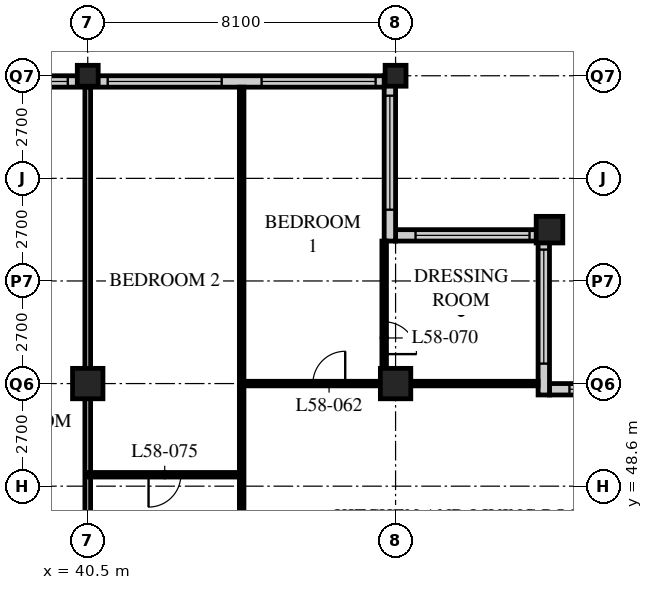
"""IFC4 building model, lengths in metres.
Left out: names, types, materials, properties, quantities, classifications, styles, units other than length and angle.
Written with IfcOpenShell. Run it as: python <this file> out.ifc"""

import sys

from ifc_helpers import new_model, si_unit, direction, frame, frame_2d, origin, origin_2d, place, context, subcontext, project, spatial, rectangle, hollow_rectangle, extrude, element, fill, save


model = new_model("IFC4")
c1 = context("Model", 3, precision=1e-05, world=origin(), true_north=direction((0.0, 1.0)))
c2 = subcontext(c1, "Body", "Model", "MODEL_VIEW")
j1 = project(units=[si_unit("LENGTHUNIT", "METRE"), si_unit("PLANEANGLEUNIT", "RADIAN")], contexts=[c1])
p1 = place(None, origin())
s1 = spatial("IfcSite", under=j1, at=p1, CompositionType="ELEMENT")
p2 = place(p1, origin())
s2 = spatial("IfcBuilding", under=s1, at=p2, CompositionType="ELEMENT")
p3 = place(p2, frame((0.0, 0.0, 224.4)))
s3 = spatial("IfcBuildingStorey", under=s2, at=p3, CompositionType="ELEMENT", Elevation=224.4)
p4 = place(p3, frame((40.5, 51.3, 0.0), z_axis=(0.0, 0.0, 1.0), x_axis=(1.0, 0.0, 0.0)))
e1 = element("IfcColumn", 1, at=p4, inside=s3, PredefinedType="COLUMN", context=c2, shape_type="SweptSolid", body=[
    extrude(hollow_rectangle(XDim=0.8, YDim=0.8, WallThickness=0.08, at=origin_2d()), origin(), (0.0, 0.0, 1.0), 3.6),
])
p5 = place(p3, frame((40.5, 59.4, 0.0), z_axis=(0.0, 0.0, 1.0), x_axis=(1.0, 0.0, 0.0)))
e2 = element("IfcColumn", 2, at=p5, inside=s3, PredefinedType="COLUMN", context=c2, shape_type="SweptSolid", body=[
    extrude(hollow_rectangle(XDim=0.55, YDim=0.55, WallThickness=0.045, at=origin_2d()), origin(), (0.0, 0.0, 1.0), 3.6),
])
p6 = place(p3, frame((48.6, 51.3, 0.0), z_axis=(0.0, 0.0, 1.0), x_axis=(1.0, 0.0, 0.0)))
e3 = element("IfcColumn", 3, at=p6, inside=s3, PredefinedType="COLUMN", context=c2, shape_type="SweptSolid", body=[
    extrude(hollow_rectangle(XDim=0.8, YDim=0.8, WallThickness=0.08, at=origin_2d()), origin(), (0.0, 0.0, 1.0), 3.6),
])
p7 = place(p3, frame((48.6, 59.4, 0.0), z_axis=(0.0, 0.0, 1.0), x_axis=(1.0, 0.0, 0.0)))
e4 = element("IfcColumn", 4, at=p7, inside=s3, PredefinedType="COLUMN", context=c2, shape_type="SweptSolid", body=[
    extrude(hollow_rectangle(XDim=0.55, YDim=0.55, WallThickness=0.045, at=origin_2d()), origin(), (0.0, 0.0, 1.0), 3.6),
])
p8 = place(p3, frame((52.65, 55.35, 0.0), z_axis=(0.0, 0.0, 1.0), x_axis=(1.0, 0.0, 0.0)))
e5 = element("IfcColumn", 5, at=p8, inside=s3, PredefinedType="COLUMN", context=c2, shape_type="SweptSolid", body=[
    extrude(hollow_rectangle(XDim=0.7, YDim=0.7, WallThickness=0.07, at=origin_2d()), origin(), (0.0, 0.0, 1.0), 3.6),
])
p9 = place(p3, frame((56.4, 51.15, 0.0), z_axis=(0.0, 0.0, 1.0), x_axis=(-1.0, 0.0, 0.0)))
e6 = element("IfcWall", 6, at=p9, inside=s3, PredefinedType="SOLIDWALL", context=c2, shape_type="SweptSolid", body=[
    extrude(rectangle(XDim=3.75, YDim=0.3, at=frame_2d((1.875, 0.0))), origin(), (0.0, 0.0, 1.0), 3.39),
])
p10 = place(p9, frame((0.225, 0.0, 0.6)))
e7 = element("IfcOpeningElement", 7, at=p10, cuts=e6, PredefinedType="OPENING", context=c2, shape_type="SweptSolid", body=[
    extrude(rectangle(XDim=3.0, YDim=2.0, at=frame_2d((1.5, 1.0))), frame((0.0, 0.16, 0.0), z_axis=(0.0, -1.0, 0.0), x_axis=(1.0, 0.0, 0.0)), (0.0, 0.0, 1.0), 0.32),
])
p11 = place(p3, frame((52.5, 51.0, 0.0), z_axis=(0.0, 0.0, 1.0), x_axis=(0.0, 1.0, 0.0)))
e8 = element("IfcWall", 8, at=p11, inside=s3, PredefinedType="SOLIDWALL", context=c2, shape_type="SweptSolid", body=[
    extrude(rectangle(XDim=4.35, YDim=0.3, at=frame_2d((2.175, 0.0))), origin(), (0.0, 0.0, 1.0), 3.39),
])
p12 = place(p11, frame((0.825, 0.0, 0.6)))
e9 = element("IfcOpeningElement", 9, at=p12, cuts=e8, PredefinedType="OPENING", context=c2, shape_type="SweptSolid", body=[
    extrude(rectangle(XDim=3.0, YDim=2.0, at=frame_2d((1.5, 1.0))), frame((0.0, 0.16, 0.0), z_axis=(0.0, -1.0, 0.0), x_axis=(1.0, 0.0, 0.0)), (0.0, 0.0, 1.0), 0.32),
])
p13 = place(p3, frame((52.35, 55.2, 0.0), z_axis=(0.0, 0.0, 1.0), x_axis=(-1.0, 0.0, 0.0)))
e10 = element("IfcWall", 10, at=p13, inside=s3, PredefinedType="SOLIDWALL", context=c2, shape_type="SweptSolid", body=[
    extrude(rectangle(XDim=3.75, YDim=0.3, at=frame_2d((1.875, 0.0))), origin(), (0.0, 0.0, 1.0), 3.39),
])
p14 = place(p13, frame((0.225, 0.0, 0.6)))
e11 = element("IfcOpeningElement", 11, at=p14, cuts=e10, PredefinedType="OPENING", context=c2, shape_type="SweptSolid", body=[
    extrude(rectangle(XDim=3.0, YDim=2.0, at=frame_2d((1.5, 1.0))), frame((0.0, 0.16, 0.0), z_axis=(0.0, -1.0, 0.0), x_axis=(1.0, 0.0, 0.0)), (0.0, 0.0, 1.0), 0.32),
])
p15 = place(p3, frame((48.45, 55.05, 0.0), z_axis=(0.0, 0.0, 1.0), x_axis=(0.0, 1.0, 0.0)))
e12 = element("IfcWall", 12, at=p15, inside=s3, PredefinedType="SOLIDWALL", context=c2, shape_type="SweptSolid", body=[
    extrude(rectangle(XDim=4.35, YDim=0.3, at=frame_2d((2.175, 0.0))), origin(), (0.0, 0.0, 1.0), 3.39),
])
p16 = place(p15, frame((0.825, 0.0, 0.6)))
e13 = element("IfcOpeningElement", 13, at=p16, cuts=e12, PredefinedType="OPENING", context=c2, shape_type="SweptSolid", body=[
    extrude(rectangle(XDim=3.0, YDim=2.0, at=frame_2d((1.5, 1.0))), frame((0.0, 0.16, 0.0), z_axis=(0.0, -1.0, 0.0), x_axis=(1.0, 0.0, 0.0)), (0.0, 0.0, 1.0), 0.32),
])
p17 = place(p3, frame((48.3, 59.25, 0.0), z_axis=(0.0, 0.0, 1.0), x_axis=(-1.0, 0.0, 0.0)))
e14 = element("IfcWall", 14, at=p17, inside=s3, PredefinedType="SOLIDWALL", context=c2, shape_type="SweptSolid", body=[
    extrude(rectangle(XDim=40.2, YDim=0.3, at=frame_2d((20.1, 0.0))), origin(), (0.0, 0.0, 1.0), 3.39),
])
p18 = place(p17, frame((0.225, 0.0, 0.6)))
e15 = element("IfcOpeningElement", 15, at=p18, cuts=e14, PredefinedType="OPENING", context=c2, shape_type="SweptSolid", body=[
    extrude(rectangle(XDim=3.0, YDim=2.0, at=frame_2d((1.5, 1.0))), frame((0.0, 0.16, 0.0), z_axis=(0.0, -1.0, 0.0), x_axis=(1.0, 0.0, 0.0)), (0.0, 0.0, 1.0), 0.32),
])
p19 = place(p17, frame((4.275, 0.0, 0.6)))
e16 = element("IfcOpeningElement", 16, at=p19, cuts=e14, PredefinedType="OPENING", context=c2, shape_type="SweptSolid", body=[
    extrude(rectangle(XDim=3.0, YDim=2.0, at=frame_2d((1.5, 1.0))), frame((0.0, 0.16, 0.0), z_axis=(0.0, -1.0, 0.0), x_axis=(1.0, 0.0, 0.0)), (0.0, 0.0, 1.0), 0.32),
])
p20 = place(p17, frame((8.325, 0.0, 0.6)))
e17 = element("IfcOpeningElement", 17, at=p20, cuts=e14, PredefinedType="OPENING", context=c2, shape_type="SweptSolid", body=[
    extrude(rectangle(XDim=3.0, YDim=2.0, at=frame_2d((1.5, 1.0))), frame((0.0, 0.16, 0.0), z_axis=(0.0, -1.0, 0.0), x_axis=(1.0, 0.0, 0.0)), (0.0, 0.0, 1.0), 0.32),
])
p21 = place(p17, frame((12.375, 0.0, 0.6)))
e18 = element("IfcOpeningElement", 18, at=p21, cuts=e14, PredefinedType="OPENING", context=c2, shape_type="SweptSolid", body=[
    extrude(rectangle(XDim=3.0, YDim=2.0, at=frame_2d((1.5, 1.0))), frame((0.0, 0.16, 0.0), z_axis=(0.0, -1.0, 0.0), x_axis=(1.0, 0.0, 0.0)), (0.0, 0.0, 1.0), 0.32),
])
p22 = place(p17, frame((16.425, 0.0, 0.6)))
e19 = element("IfcOpeningElement", 19, at=p22, cuts=e14, PredefinedType="OPENING", context=c2, shape_type="SweptSolid", body=[
    extrude(rectangle(XDim=3.0, YDim=2.0, at=frame_2d((1.5, 1.0))), frame((0.0, 0.16, 0.0), z_axis=(0.0, -1.0, 0.0), x_axis=(1.0, 0.0, 0.0)), (0.0, 0.0, 1.0), 0.32),
])
p23 = place(p17, frame((20.475, 0.0, 0.6)))
e20 = element("IfcOpeningElement", 20, at=p23, cuts=e14, PredefinedType="OPENING", context=c2, shape_type="SweptSolid", body=[
    extrude(rectangle(XDim=3.0, YDim=2.0, at=frame_2d((1.5, 1.0))), frame((0.0, 0.16, 0.0), z_axis=(0.0, -1.0, 0.0), x_axis=(1.0, 0.0, 0.0)), (0.0, 0.0, 1.0), 0.32),
])
p24 = place(p17, frame((24.525, 0.0, 0.6)))
e21 = element("IfcOpeningElement", 21, at=p24, cuts=e14, PredefinedType="OPENING", context=c2, shape_type="SweptSolid", body=[
    extrude(rectangle(XDim=3.0, YDim=2.0, at=frame_2d((1.5, 1.0))), frame((0.0, 0.16, 0.0), z_axis=(0.0, -1.0, 0.0), x_axis=(1.0, 0.0, 0.0)), (0.0, 0.0, 1.0), 0.32),
])
p25 = place(p17, frame((28.575, 0.0, 0.6)))
e22 = element("IfcOpeningElement", 22, at=p25, cuts=e14, PredefinedType="OPENING", context=c2, shape_type="SweptSolid", body=[
    extrude(rectangle(XDim=3.0, YDim=2.0, at=frame_2d((1.5, 1.0))), frame((0.0, 0.16, 0.0), z_axis=(0.0, -1.0, 0.0), x_axis=(1.0, 0.0, 0.0)), (0.0, 0.0, 1.0), 0.32),
])
p26 = place(p17, frame((32.625, 0.0, 0.6)))
e23 = element("IfcOpeningElement", 23, at=p26, cuts=e14, PredefinedType="OPENING", context=c2, shape_type="SweptSolid", body=[
    extrude(rectangle(XDim=3.0, YDim=2.0, at=frame_2d((1.5, 1.0))), frame((0.0, 0.16, 0.0), z_axis=(0.0, -1.0, 0.0), x_axis=(1.0, 0.0, 0.0)), (0.0, 0.0, 1.0), 0.32),
])
p27 = place(p17, frame((36.675, 0.0, 0.6)))
e24 = element("IfcOpeningElement", 24, at=p27, cuts=e14, PredefinedType="OPENING", context=c2, shape_type="SweptSolid", body=[
    extrude(rectangle(XDim=3.0, YDim=2.0, at=frame_2d((1.5, 1.0))), frame((0.0, 0.16, 0.0), z_axis=(0.0, -1.0, 0.0), x_axis=(1.0, 0.0, 0.0)), (0.0, 0.0, 1.0), 0.32),
])
p28 = place(p3, frame((44.55, 45.6, 0.0), z_axis=(0.0, 0.0, 1.0), x_axis=(0.0, 1.0, 0.0)))
e25 = element("IfcWall", 25, at=p28, inside=s3, PredefinedType="PARTITIONING", context=c2, shape_type="SweptSolid", body=[
    extrude(rectangle(XDim=13.5, YDim=0.12, at=frame_2d((6.75, 0.0))), origin(), (0.0, 0.0, 1.0), 3.39),
])
p29 = place(p3, frame((44.55, 51.3, 0.0), z_axis=(0.0, 0.0, 1.0), x_axis=(1.0, 0.0, 0.0)))
e26 = element("IfcWall", 26, at=p29, inside=s3, PredefinedType="PARTITIONING", context=c2, shape_type="SweptSolid", body=[
    extrude(rectangle(XDim=7.8, YDim=0.12, at=frame_2d((3.9, 0.0))), origin(), (0.0, 0.0, 1.0), 2.628),
])
p30 = place(p29, frame((1.875, 0.0, 0.0)))
e27 = element("IfcOpeningElement", 27, at=p30, cuts=e26, PredefinedType="OPENING", context=c2, shape_type="SweptSolid", body=[
    extrude(rectangle(XDim=0.85, YDim=2.1, at=frame_2d((0.425, 1.05))), frame((0.0, 0.07, 0.0), z_axis=(0.0, -1.0, 0.0), x_axis=(1.0, 0.0, 0.0)), (0.0, 0.0, 1.0), 0.14),
])
p31 = place(p3, frame((40.5, 43.2, 0.0), z_axis=(0.0, 0.0, 1.0), x_axis=(0.0, 1.0, 0.0)))
e28 = element("IfcWall", 28, at=p31, inside=s3, PredefinedType="PARTITIONING", context=c2, shape_type="SweptSolid", body=[
    extrude(rectangle(XDim=15.9, YDim=0.15, at=frame_2d((7.95, 0.0))), origin(), (0.0, 0.0, 1.0), 2.628),
])
p32 = place(p3, frame((48.3, 51.3, 0.0), z_axis=(0.0, 0.0, 1.0), x_axis=(0.0, 1.0, 0.0)))
e29 = element("IfcWall", 29, at=p32, inside=s3, PredefinedType="PARTITIONING", context=c2, shape_type="SweptSolid", body=[
    extrude(rectangle(XDim=3.75, YDim=0.12, at=frame_2d((1.875, 0.0))), origin(), (0.0, 0.0, 1.0), 3.39),
])
p33 = place(p32, frame((0.775, 0.0, 0.0)))
e30 = element("IfcOpeningElement", 30, at=p33, cuts=e29, PredefinedType="OPENING", context=c2, shape_type="SweptSolid", body=[
    extrude(rectangle(XDim=0.85, YDim=2.1, at=frame_2d((0.425, 1.05))), frame((0.0, 0.07, 0.0), z_axis=(0.0, -1.0, 0.0), x_axis=(1.0, 0.0, 0.0)), (0.0, 0.0, 1.0), 0.14),
])
p34 = place(p3, frame((40.5, 48.9, 0.0), z_axis=(0.0, 0.0, 1.0), x_axis=(1.0, 0.0, 0.0)))
e31 = element("IfcWall", 31, at=p34, inside=s3, PredefinedType="PARTITIONING", context=c2, shape_type="SweptSolid", body=[
    extrude(rectangle(XDim=4.05, YDim=0.12, at=frame_2d((2.025, 0.0))), origin(), (0.0, 0.0, 1.0), 3.39),
])
p35 = place(p34, frame((1.6, 0.0, 0.0)))
e32 = element("IfcOpeningElement", 32, at=p35, cuts=e31, PredefinedType="OPENING", context=c2, shape_type="SweptSolid", body=[
    extrude(rectangle(XDim=0.85, YDim=2.1, at=frame_2d((0.425, 1.05))), frame((0.0, 0.07, 0.0), z_axis=(0.0, -1.0, 0.0), x_axis=(1.0, 0.0, 0.0)), (0.0, 0.0, 1.0), 0.14),
])
p36 = place(p10, origin())
e33 = element("IfcWindow", 33, at=p36, inside=s3, PartitioningType="SINGLE_PANEL", PredefinedType="WINDOW", context=c2, shape_type="SweptSolid", body=[
    extrude(rectangle(XDim=3.0, YDim=2.0, at=frame_2d((1.5, 1.0))), frame((0.0, 0.03, 0.0), z_axis=(0.0, -1.0, 0.0), x_axis=(1.0, 0.0, 0.0)), (0.0, 0.0, 1.0), 0.06),
])
fill(e7, e33)
p37 = place(p12, origin())
e34 = element("IfcWindow", 34, at=p37, inside=s3, PartitioningType="SINGLE_PANEL", PredefinedType="WINDOW", context=c2, shape_type="SweptSolid", body=[
    extrude(rectangle(XDim=3.0, YDim=2.0, at=frame_2d((1.5, 1.0))), frame((0.0, 0.03, 0.0), z_axis=(0.0, -1.0, 0.0), x_axis=(1.0, 0.0, 0.0)), (0.0, 0.0, 1.0), 0.06),
])
fill(e9, e34)
p38 = place(p14, origin())
e35 = element("IfcWindow", 35, at=p38, inside=s3, PartitioningType="SINGLE_PANEL", PredefinedType="WINDOW", context=c2, shape_type="SweptSolid", body=[
    extrude(rectangle(XDim=3.0, YDim=2.0, at=frame_2d((1.5, 1.0))), frame((0.0, 0.03, 0.0), z_axis=(0.0, -1.0, 0.0), x_axis=(1.0, 0.0, 0.0)), (0.0, 0.0, 1.0), 0.06),
])
fill(e11, e35)
p39 = place(p16, origin())
e36 = element("IfcWindow", 36, at=p39, inside=s3, PartitioningType="SINGLE_PANEL", PredefinedType="WINDOW", context=c2, shape_type="SweptSolid", body=[
    extrude(rectangle(XDim=3.0, YDim=2.0, at=frame_2d((1.5, 1.0))), frame((0.0, 0.03, 0.0), z_axis=(0.0, -1.0, 0.0), x_axis=(1.0, 0.0, 0.0)), (0.0, 0.0, 1.0), 0.06),
])
fill(e13, e36)
p40 = place(p18, origin())
e37 = element("IfcWindow", 37, at=p40, inside=s3, PartitioningType="SINGLE_PANEL", PredefinedType="WINDOW", context=c2, shape_type="SweptSolid", body=[
    extrude(rectangle(XDim=3.0, YDim=2.0, at=frame_2d((1.5, 1.0))), frame((0.0, 0.03, 0.0), z_axis=(0.0, -1.0, 0.0), x_axis=(1.0, 0.0, 0.0)), (0.0, 0.0, 1.0), 0.06),
])
fill(e15, e37)
p41 = place(p19, origin())
e38 = element("IfcWindow", 38, at=p41, inside=s3, PartitioningType="SINGLE_PANEL", PredefinedType="WINDOW", context=c2, shape_type="SweptSolid", body=[
    extrude(rectangle(XDim=3.0, YDim=2.0, at=frame_2d((1.5, 1.0))), frame((0.0, 0.03, 0.0), z_axis=(0.0, -1.0, 0.0), x_axis=(1.0, 0.0, 0.0)), (0.0, 0.0, 1.0), 0.06),
])
fill(e16, e38)
p42 = place(p20, origin())
e39 = element("IfcWindow", 39, at=p42, inside=s3, PartitioningType="SINGLE_PANEL", PredefinedType="WINDOW", context=c2, shape_type="SweptSolid", body=[
    extrude(rectangle(XDim=3.0, YDim=2.0, at=frame_2d((1.5, 1.0))), frame((0.0, 0.03, 0.0), z_axis=(0.0, -1.0, 0.0), x_axis=(1.0, 0.0, 0.0)), (0.0, 0.0, 1.0), 0.06),
])
fill(e17, e39)
p43 = place(p30, origin())
e40 = element("IfcDoor", 40, at=p43, inside=s3, OperationType="SINGLE_SWING_RIGHT", PredefinedType="DOOR", context=c2, shape_type="SweptSolid", body=[
    extrude(rectangle(XDim=0.85, YDim=2.1, at=frame_2d((0.425, 1.05))), frame((0.0, 0.025, 0.0), z_axis=(0.0, -1.0, 0.0), x_axis=(1.0, 0.0, 0.0)), (0.0, 0.0, 1.0), 0.05),
])
fill(e27, e40)
p44 = place(p33, origin())
e41 = element("IfcDoor", 41, at=p44, inside=s3, OperationType="SINGLE_SWING_RIGHT", PredefinedType="DOOR", context=c2, shape_type="SweptSolid", body=[
    extrude(rectangle(XDim=0.85, YDim=2.1, at=frame_2d((0.425, 1.05))), frame((0.0, 0.025, 0.0), z_axis=(0.0, -1.0, 0.0), x_axis=(1.0, 0.0, 0.0)), (0.0, 0.0, 1.0), 0.05),
])
fill(e30, e41)
p45 = place(p35, origin())
e42 = element("IfcDoor", 42, at=p45, inside=s3, OperationType="SINGLE_SWING_RIGHT", PredefinedType="DOOR", context=c2, shape_type="SweptSolid", body=[
    extrude(rectangle(XDim=0.85, YDim=2.1, at=frame_2d((0.425, 1.05))), frame((0.0, 0.025, 0.0), z_axis=(0.0, -1.0, 0.0), x_axis=(1.0, 0.0, 0.0)), (0.0, 0.0, 1.0), 0.05),
])
fill(e32, e42)
save(model, sys.argv[1])
